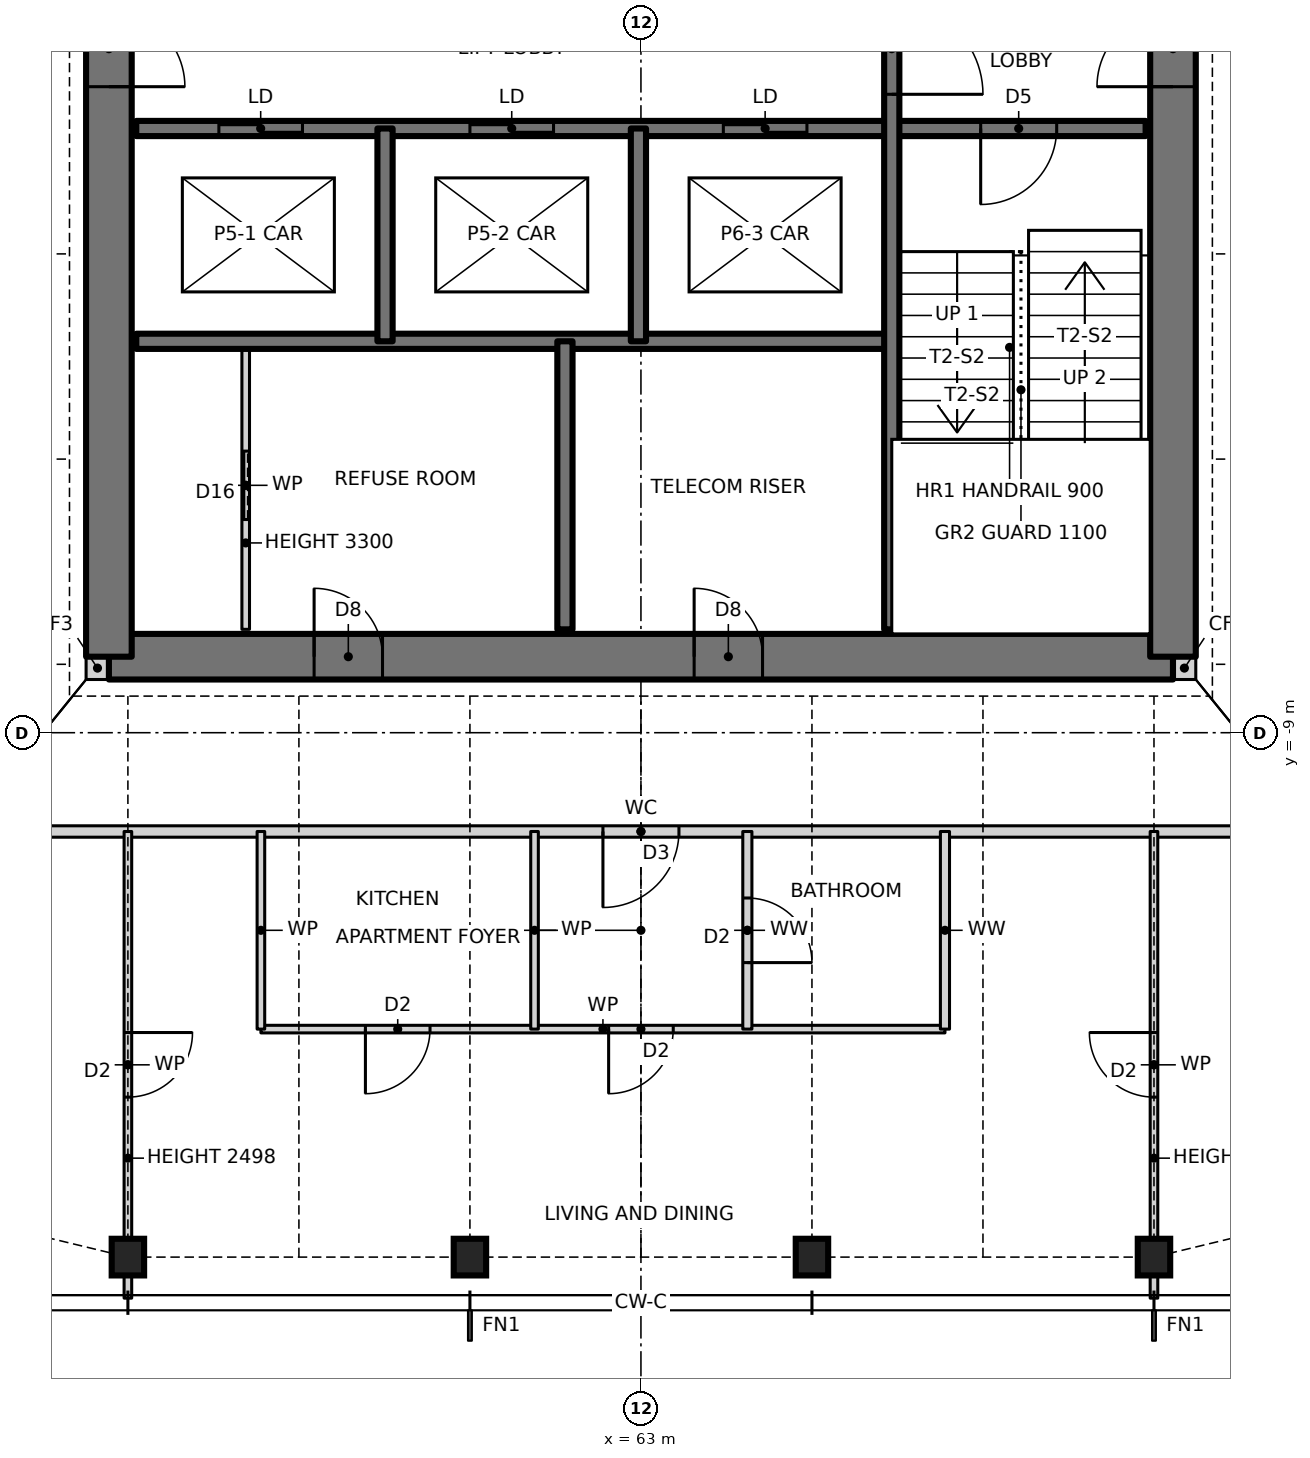
"""IFC4 building model, lengths in metres.
Left out: names, types, materials, properties, quantities, classifications, styles, units other than length and angle.
Written with IfcOpenShell. Run it as: python <this file> out.ifc"""

import sys

from ifc_helpers import new_model, si_unit, direction, frame, frame_2d, origin, origin_2d, place, context, subcontext, project, spatial, rectangle, i_section, extrude, element, fill, save


model = new_model("IFC4")
c1 = context("Model", 3, precision=1e-05, world=origin(), true_north=direction((0.0, 1.0)))
c2 = subcontext(c1, "Body", "Model", "MODEL_VIEW")
j1 = project(units=[si_unit("LENGTHUNIT", "METRE"), si_unit("PLANEANGLEUNIT", "RADIAN")], contexts=[c1])
p1 = place(None, origin())
s1 = spatial("IfcSite", under=j1, at=p1, CompositionType="ELEMENT")
p2 = place(p1, origin())
s2 = spatial("IfcBuilding", under=s1, at=p2, CompositionType="ELEMENT")
p3 = place(p2, frame((0.0, 0.0, 94.5)))
s3 = spatial("IfcBuildingStorey", under=s2, at=p3, CompositionType="ELEMENT", Elevation=94.5)
for number, where, z_axis, x_axis in (
    (1, (56.25, -15.9, 0.0), (0.0, 0.0, 1.0), (1.0, 0.0, 0.0)),
    (2, (60.75, -15.9, 0.0), (0.0, 0.0, 1.0), (1.0, 0.0, 0.0)),
    (3, (65.25, -15.9, 0.0), (0.0, 0.0, 1.0), (1.0, 0.0, 0.0)),
    (4, (69.75, -15.9, 0.0), (0.0, 0.0, 1.0), (1.0, 0.0, 0.0)),
):
    element("IfcColumn", number, at=place(p3, frame(where, z_axis=z_axis, x_axis=x_axis)), inside=s3, PredefinedType="COLUMN", context=c2, shape_type="SweptSolid", body=[
        extrude(i_section(OverallWidth=0.427, OverallDepth=0.483, WebThickness=0.051, FlangeThickness=0.082, at=origin_2d()), origin(), (0.0, 0.0, 1.0), 3.5),
    ])
for number, where, z_axis, x_axis in (
    (5, (55.7, -8.15, 0.0), (0.0, 0.0, 1.0), (1.0, 0.0, 0.0)),
    (6, (70.0, -8.15, 0.0), (0.0, 0.0, 1.0), (1.0, 0.0, 0.0)),
):
    element("IfcWall", number, at=place(p3, frame(where, z_axis=z_axis, x_axis=x_axis)), inside=s3, PredefinedType="SOLIDWALL", context=c2, shape_type="SweptSolid", body=[
        extrude(rectangle(XDim=0.3, YDim=0.3, at=frame_2d((0.15, 0.0))), origin(), (0.0, 0.0, 1.0), 3.5),
    ])
p4 = place(p3, frame((56.0, -8.0, 0.0), z_axis=(0.0, 0.0, 1.0), x_axis=(1.0, 0.0, 0.0)))
e7 = element("IfcWall", 7, at=p4, inside=s3, PredefinedType="SHEAR", context=c2, shape_type="SweptSolid", body=[
    extrude(rectangle(XDim=14.0, YDim=0.6, at=frame_2d((7.0, 0.0))), origin(), (0.0, 0.0, 1.0), 3.5),
])
p5 = place(p4, frame((2.7, 0.0, 0.0)))
e8 = element("IfcOpeningElement", 8, at=p5, cuts=e7, PredefinedType="OPENING", context=c2, shape_type="SweptSolid", body=[
    extrude(rectangle(XDim=0.9, YDim=2.1, at=frame_2d((0.45, 1.05))), frame((0.0, 0.31, 0.0), z_axis=(0.0, -1.0, 0.0), x_axis=(1.0, 0.0, 0.0)), (0.0, 0.0, 1.0), 0.62),
])
p6 = place(p4, frame((7.7, 0.0, 0.0)))
e9 = element("IfcOpeningElement", 9, at=p6, cuts=e7, PredefinedType="OPENING", context=c2, shape_type="SweptSolid", body=[
    extrude(rectangle(XDim=0.9, YDim=2.1, at=frame_2d((0.45, 1.05))), frame((0.0, 0.31, 0.0), z_axis=(0.0, -1.0, 0.0), x_axis=(1.0, 0.0, 0.0)), (0.0, 0.0, 1.0), 0.62),
])
p7 = place(p3, frame((70.0, -8.0, 0.0), z_axis=(0.0, 0.0, 1.0), x_axis=(0.0, 1.0, 0.0)))
e10 = element("IfcWall", 10, at=p7, inside=s3, PredefinedType="SHEAR", context=c2, shape_type="SweptSolid", body=[
    extrude(rectangle(XDim=16.0, YDim=0.6, at=frame_2d((8.0, 0.0))), origin(), (0.0, 0.0, 1.0), 3.5),
])
p8 = place(p7, frame((7.5, 0.0, 0.0)))
e11 = element("IfcOpeningElement", 11, at=p8, cuts=e10, PredefinedType="OPENING", context=c2, shape_type="SweptSolid", body=[
    extrude(rectangle(XDim=1.0, YDim=2.1, at=frame_2d((0.5, 1.05))), frame((0.0, 0.31, 0.0), z_axis=(0.0, -1.0, 0.0), x_axis=(1.0, 0.0, 0.0)), (0.0, 0.0, 1.0), 0.62),
])
p9 = place(p3, frame((56.0, 8.0, 0.0), z_axis=(0.0, 0.0, 1.0), x_axis=(0.0, -1.0, 0.0)))
e12 = element("IfcWall", 12, at=p9, inside=s3, PredefinedType="SHEAR", context=c2, shape_type="SweptSolid", body=[
    extrude(rectangle(XDim=16.0, YDim=0.6, at=frame_2d((8.0, 0.0))), origin(), (0.0, 0.0, 1.0), 3.5),
])
p10 = place(p9, frame((7.5, 0.0, 0.0)))
e13 = element("IfcOpeningElement", 13, at=p10, cuts=e12, PredefinedType="OPENING", context=c2, shape_type="SweptSolid", body=[
    extrude(rectangle(XDim=1.0, YDim=2.1, at=frame_2d((0.5, 1.05))), frame((0.0, 0.31, 0.0), z_axis=(0.0, -1.0, 0.0), x_axis=(1.0, 0.0, 0.0)), (0.0, 0.0, 1.0), 0.62),
])
p11 = place(p3, frame((58.0, -12.9, 0.0), z_axis=(0.0, 0.0, 1.0), x_axis=(1.0, 0.0, 0.0)))
e14 = element("IfcWall", 14, at=p11, inside=s3, PredefinedType="PARTITIONING", context=c2, shape_type="SweptSolid", body=[
    extrude(rectangle(XDim=9.0, YDim=0.1, at=frame_2d((4.5, 0.0))), origin(), (0.0, 0.0, 1.0), 3.27),
])
p12 = place(p11, frame((1.375, 0.0, 0.0)))
e15 = element("IfcOpeningElement", 15, at=p12, cuts=e14, PredefinedType="OPENING", context=c2, shape_type="SweptSolid", body=[
    extrude(rectangle(XDim=0.85, YDim=2.1, at=frame_2d((0.425, 1.05))), frame((0.0, 0.06, 0.0), z_axis=(0.0, -1.0, 0.0), x_axis=(1.0, 0.0, 0.0)), (0.0, 0.0, 1.0), 0.12),
])
p13 = place(p11, frame((4.575, 0.0, 0.0)))
e16 = element("IfcOpeningElement", 16, at=p13, cuts=e14, PredefinedType="OPENING", context=c2, shape_type="SweptSolid", body=[
    extrude(rectangle(XDim=0.85, YDim=2.1, at=frame_2d((0.425, 1.05))), frame((0.0, 0.06, 0.0), z_axis=(0.0, -1.0, 0.0), x_axis=(1.0, 0.0, 0.0)), (0.0, 0.0, 1.0), 0.12),
])
p14 = place(p3, frame((53.7, -10.3, 0.0), z_axis=(0.0, 0.0, 1.0), x_axis=(1.0, 0.0, 0.0)))
e17 = element("IfcWall", 17, at=p14, inside=s3, PredefinedType="PARTITIONING", context=c2, shape_type="SweptSolid", body=[
    extrude(rectangle(XDim=18.6, YDim=0.15, at=frame_2d((9.3, 0.0))), origin(), (0.0, 0.0, 1.0), 3.27),
])
p15 = place(p14, frame((8.8, 0.0, 0.0)))
e18 = element("IfcOpeningElement", 18, at=p15, cuts=e17, PredefinedType="OPENING", context=c2, shape_type="SweptSolid", body=[
    extrude(rectangle(XDim=1.0, YDim=2.1, at=frame_2d((0.5, 1.05))), frame((0.0, 0.085, 0.0), z_axis=(0.0, -1.0, 0.0), x_axis=(1.0, 0.0, 0.0)), (0.0, 0.0, 1.0), 0.17),
])
p16 = place(p3, frame((56.36, -3.85, 0.0), z_axis=(0.0, 0.0, 1.0), x_axis=(1.0, 0.0, 0.0)))
e19 = element("IfcWall", 19, at=p16, inside=s3, PredefinedType="SOLIDWALL", context=c2, shape_type="SweptSolid", body=[
    extrude(rectangle(XDim=9.94, YDim=0.2, at=frame_2d((4.97, 0.0))), origin(), (0.0, 0.0, 1.0), 3.5),
])
p17 = place(p3, frame((56.36, -1.05, 0.0), z_axis=(0.0, 0.0, 1.0), x_axis=(1.0, 0.0, 0.0)))
e20 = element("IfcWall", 20, at=p17, inside=s3, PredefinedType="SOLIDWALL", context=c2, shape_type="SweptSolid", body=[
    extrude(rectangle(XDim=13.28, YDim=0.2, at=frame_2d((6.64, 0.0))), origin(), (0.0, 0.0, 1.0), 3.5),
])
p18 = place(p17, frame((11.11, 0.0, 0.0)))
e21 = element("IfcOpeningElement", 21, at=p18, cuts=e20, PredefinedType="OPENING", context=c2, shape_type="SweptSolid", body=[
    extrude(rectangle(XDim=1.0, YDim=2.1, at=frame_2d((0.5, 1.05))), frame((0.0, 0.11, 0.0), z_axis=(0.0, -1.0, 0.0), x_axis=(1.0, 0.0, 0.0)), (0.0, 0.0, 1.0), 0.22),
])
p19 = place(p17, frame((1.087, 0.0, 0.0)))
e22 = element("IfcOpeningElement", 22, at=p19, cuts=e20, PredefinedType="OPENING", context=c2, shape_type="SweptSolid", body=[
    extrude(rectangle(XDim=1.1, YDim=2.1, at=frame_2d((0.55, 1.05))), frame((0.0, 0.11, 0.0), z_axis=(0.0, -1.0, 0.0), x_axis=(1.0, 0.0, 0.0)), (0.0, 0.0, 1.0), 0.22),
])
p20 = place(p17, frame((4.39, 0.0, 0.0)))
e23 = element("IfcOpeningElement", 23, at=p20, cuts=e20, PredefinedType="OPENING", context=c2, shape_type="SweptSolid", body=[
    extrude(rectangle(XDim=1.1, YDim=2.1, at=frame_2d((0.55, 1.05))), frame((0.0, 0.11, 0.0), z_axis=(0.0, -1.0, 0.0), x_axis=(1.0, 0.0, 0.0)), (0.0, 0.0, 1.0), 0.22),
])
p21 = place(p17, frame((7.724, 0.0, 0.0)))
e24 = element("IfcOpeningElement", 24, at=p21, cuts=e20, PredefinedType="OPENING", context=c2, shape_type="SweptSolid", body=[
    extrude(rectangle(XDim=1.1, YDim=2.1, at=frame_2d((0.55, 1.05))), frame((0.0, 0.11, 0.0), z_axis=(0.0, -1.0, 0.0), x_axis=(1.0, 0.0, 0.0)), (0.0, 0.0, 1.0), 0.22),
])
p22 = place(p3, frame((69.75, -16.44, 0.0), z_axis=(0.0, 0.0, 1.0), x_axis=(0.0, 1.0, 0.0)))
e25 = element("IfcWall", 25, at=p22, inside=s3, PredefinedType="PARTITIONING", context=c2, shape_type="SweptSolid", body=[
    extrude(rectangle(XDim=6.14, YDim=0.1, at=frame_2d((3.07, 0.0))), origin(), (0.0, 0.0, 1.0), 2.498),
])
p23 = place(p22, frame((2.645, 0.0, 0.0)))
e26 = element("IfcOpeningElement", 26, at=p23, cuts=e25, PredefinedType="OPENING", context=c2, shape_type="SweptSolid", body=[
    extrude(rectangle(XDim=0.85, YDim=2.1, at=frame_2d((0.425, 1.05))), frame((0.0, 0.06, 0.0), z_axis=(0.0, -1.0, 0.0), x_axis=(1.0, 0.0, 0.0)), (0.0, 0.0, 1.0), 0.12),
])
p24 = place(p3, frame((67.0, -12.9, 0.0), z_axis=(0.0, 0.0, 1.0), x_axis=(0.0, 1.0, 0.0)))
e27 = element("IfcWall", 27, at=p24, inside=s3, PredefinedType="PARTITIONING", context=c2, shape_type="SweptSolid", body=[
    extrude(rectangle(XDim=2.6, YDim=0.12, at=frame_2d((1.3, 0.0))), origin(), (0.0, 0.0, 1.0), 3.27),
])
p25 = place(p3, frame((66.3, -7.64, 0.0), z_axis=(0.0, 0.0, 1.0), x_axis=(0.0, 1.0, 0.0)))
e28 = element("IfcWall", 28, at=p25, inside=s3, PredefinedType="SOLIDWALL", context=c2, shape_type="SweptSolid", body=[
    extrude(rectangle(XDim=11.49, YDim=0.2, at=frame_2d((5.745, 0.0))), origin(), (0.0, 0.0, 1.0), 3.5),
])
p26 = place(p25, frame((7.04, 0.0, 0.0)))
e29 = element("IfcOpeningElement", 29, at=p26, cuts=e28, PredefinedType="OPENING", context=c2, shape_type="SweptSolid", body=[
    extrude(rectangle(XDim=1.2, YDim=2.1, at=frame_2d((0.6, 1.05))), frame((0.0, 0.11, 0.0), z_axis=(0.0, -1.0, 0.0), x_axis=(1.0, 0.0, 0.0)), (0.0, 0.0, 1.0), 0.22),
])
p27 = place(p3, frame((64.4, -12.9, 0.0), z_axis=(0.0, 0.0, 1.0), x_axis=(0.0, 1.0, 0.0)))
e30 = element("IfcWall", 30, at=p27, inside=s3, PredefinedType="PARTITIONING", context=c2, shape_type="SweptSolid", body=[
    extrude(rectangle(XDim=2.6, YDim=0.12, at=frame_2d((1.3, 0.0))), origin(), (0.0, 0.0, 1.0), 3.27),
])
p28 = place(p27, frame((0.875, 0.0, 0.0)))
e31 = element("IfcOpeningElement", 31, at=p28, cuts=e30, PredefinedType="OPENING", context=c2, shape_type="SweptSolid", body=[
    extrude(rectangle(XDim=0.85, YDim=2.1, at=frame_2d((0.425, 1.05))), frame((0.0, 0.07, 0.0), z_axis=(0.0, -1.0, 0.0), x_axis=(1.0, 0.0, 0.0)), (0.0, 0.0, 1.0), 0.14),
])
p29 = place(p3, frame((62.967, -3.85, 0.0), z_axis=(0.0, 0.0, 1.0), x_axis=(0.0, 1.0, 0.0)))
e32 = element("IfcWall", 32, at=p29, inside=s3, PredefinedType="SOLIDWALL", context=c2, shape_type="SweptSolid", body=[
    extrude(rectangle(XDim=2.8, YDim=0.2, at=frame_2d((1.4, 0.0))), origin(), (0.0, 0.0, 1.0), 3.5),
])
p30 = place(p3, frame((62.0, -7.64, 0.0), z_axis=(0.0, 0.0, 1.0), x_axis=(0.0, 1.0, 0.0)))
e33 = element("IfcWall", 33, at=p30, inside=s3, PredefinedType="SOLIDWALL", context=c2, shape_type="SweptSolid", body=[
    extrude(rectangle(XDim=3.79, YDim=0.2, at=frame_2d((1.895, 0.0))), origin(), (0.0, 0.0, 1.0), 3.5),
])
p31 = place(p3, frame((61.6, -12.9, 0.0), z_axis=(0.0, 0.0, 1.0), x_axis=(0.0, 1.0, 0.0)))
e34 = element("IfcWall", 34, at=p31, inside=s3, PredefinedType="PARTITIONING", context=c2, shape_type="SweptSolid", body=[
    extrude(rectangle(XDim=2.6, YDim=0.1, at=frame_2d((1.3, 0.0))), origin(), (0.0, 0.0, 1.0), 3.27),
])
p32 = place(p3, frame((59.633, -3.85, 0.0), z_axis=(0.0, 0.0, 1.0), x_axis=(0.0, 1.0, 0.0)))
e35 = element("IfcWall", 35, at=p32, inside=s3, PredefinedType="SOLIDWALL", context=c2, shape_type="SweptSolid", body=[
    extrude(rectangle(XDim=2.8, YDim=0.2, at=frame_2d((1.4, 0.0))), origin(), (0.0, 0.0, 1.0), 3.5),
])
p33 = place(p3, frame((58.0, -12.9, 0.0), z_axis=(0.0, 0.0, 1.0), x_axis=(0.0, 1.0, 0.0)))
e36 = element("IfcWall", 36, at=p33, inside=s3, PredefinedType="PARTITIONING", context=c2, shape_type="SweptSolid", body=[
    extrude(rectangle(XDim=2.6, YDim=0.1, at=frame_2d((1.3, 0.0))), origin(), (0.0, 0.0, 1.0), 3.27),
])
p34 = place(p3, frame((57.8, -7.64, 0.0), z_axis=(0.0, 0.0, 1.0), x_axis=(0.0, 1.0, 0.0)))
e37 = element("IfcWall", 37, at=p34, inside=s3, PredefinedType="PARTITIONING", context=c2, shape_type="SweptSolid", body=[
    extrude(rectangle(XDim=3.79, YDim=0.1, at=frame_2d((1.895, 0.0))), origin(), (0.0, 0.0, 1.0), 3.3),
])
p35 = place(p34, frame((1.445, 0.0, 0.0)))
e38 = element("IfcOpeningElement", 38, at=p35, cuts=e37, PredefinedType="OPENING", context=c2, shape_type="SweptSolid", body=[
    extrude(rectangle(XDim=0.9, YDim=2.1, at=frame_2d((0.45, 1.05))), frame((0.0, 0.06, 0.0), z_axis=(0.0, -1.0, 0.0), x_axis=(1.0, 0.0, 0.0)), (0.0, 0.0, 1.0), 0.12),
])
p36 = place(p3, frame((56.25, -16.44, 0.0), z_axis=(0.0, 0.0, 1.0), x_axis=(0.0, 1.0, 0.0)))
e39 = element("IfcWall", 39, at=p36, inside=s3, PredefinedType="PARTITIONING", context=c2, shape_type="SweptSolid", body=[
    extrude(rectangle(XDim=6.14, YDim=0.1, at=frame_2d((3.07, 0.0))), origin(), (0.0, 0.0, 1.0), 2.498),
])
p37 = place(p36, frame((2.645, 0.0, 0.0)))
e40 = element("IfcOpeningElement", 40, at=p37, cuts=e39, PredefinedType="OPENING", context=c2, shape_type="SweptSolid", body=[
    extrude(rectangle(XDim=0.85, YDim=2.1, at=frame_2d((0.425, 1.05))), frame((0.0, 0.06, 0.0), z_axis=(0.0, -1.0, 0.0), x_axis=(1.0, 0.0, 0.0)), (0.0, 0.0, 1.0), 0.12),
])
p38 = place(p18, frame((1.0, 0.0, 0.0), z_axis=(0.0, 0.0, 1.0), x_axis=(-1.0, 0.0, 0.0)))
e41 = element("IfcDoor", 41, at=p38, inside=s3, OperationType="SINGLE_SWING_RIGHT", PredefinedType="DOOR", context=c2, shape_type="SweptSolid", body=[
    extrude(rectangle(XDim=1.0, YDim=2.1, at=frame_2d((0.5, 1.05))), frame((0.0, 0.025, 0.0), z_axis=(0.0, -1.0, 0.0), x_axis=(1.0, 0.0, 0.0)), (0.0, 0.0, 1.0), 0.05),
])
fill(e21, e41)
p39 = place(p26, frame((1.2, 0.0, 0.0), z_axis=(0.0, 0.0, 1.0), x_axis=(-1.0, 0.0, 0.0)))
e42 = element("IfcDoor", 42, at=p39, inside=s3, OperationType="SINGLE_SWING_RIGHT", PredefinedType="DOOR", context=c2, shape_type="SweptSolid", body=[
    extrude(rectangle(XDim=1.2, YDim=2.1, at=frame_2d((0.6, 1.05))), frame((0.0, 0.025, 0.0), z_axis=(0.0, -1.0, 0.0), x_axis=(1.0, 0.0, 0.0)), (0.0, 0.0, 1.0), 0.05),
])
fill(e29, e42)
p40 = place(p35, origin())
e43 = element("IfcDoor", 43, at=p40, inside=s3, OperationType="SLIDING_TO_LEFT", PredefinedType="DOOR", context=c2, shape_type="SweptSolid", body=[
    extrude(rectangle(XDim=0.9, YDim=2.1, at=frame_2d((0.45, 1.05))), frame((0.0, 0.025, 0.0), z_axis=(0.0, -1.0, 0.0), x_axis=(1.0, 0.0, 0.0)), (0.0, 0.0, 1.0), 0.05),
])
fill(e38, e43)
p41 = place(p12, frame((0.85, 0.0, 0.0), z_axis=(0.0, 0.0, 1.0), x_axis=(-1.0, 0.0, 0.0)))
e44 = element("IfcDoor", 44, at=p41, inside=s3, OperationType="SINGLE_SWING_RIGHT", PredefinedType="DOOR", context=c2, shape_type="SweptSolid", body=[
    extrude(rectangle(XDim=0.85, YDim=2.1, at=frame_2d((0.425, 1.05))), frame((0.0, 0.025, 0.0), z_axis=(0.0, -1.0, 0.0), x_axis=(1.0, 0.0, 0.0)), (0.0, 0.0, 1.0), 0.05),
])
fill(e15, e44)
p42 = place(p15, frame((1.0, 0.0, 0.0), z_axis=(0.0, 0.0, 1.0), x_axis=(-1.0, 0.0, 0.0)))
e45 = element("IfcDoor", 45, at=p42, inside=s3, OperationType="SINGLE_SWING_RIGHT", PredefinedType="DOOR", context=c2, shape_type="SweptSolid", body=[
    extrude(rectangle(XDim=1.0, YDim=2.1, at=frame_2d((0.5, 1.05))), frame((0.0, 0.025, 0.0), z_axis=(0.0, -1.0, 0.0), x_axis=(1.0, 0.0, 0.0)), (0.0, 0.0, 1.0), 0.05),
])
fill(e18, e45)
p43 = place(p13, frame((0.85, 0.0, 0.0), z_axis=(0.0, 0.0, 1.0), x_axis=(-1.0, 0.0, 0.0)))
e46 = element("IfcDoor", 46, at=p43, inside=s3, OperationType="SINGLE_SWING_RIGHT", PredefinedType="DOOR", context=c2, shape_type="SweptSolid", body=[
    extrude(rectangle(XDim=0.85, YDim=2.1, at=frame_2d((0.425, 1.05))), frame((0.0, 0.025, 0.0), z_axis=(0.0, -1.0, 0.0), x_axis=(1.0, 0.0, 0.0)), (0.0, 0.0, 1.0), 0.05),
])
fill(e16, e46)
p44 = place(p28, frame((0.85, 0.0, 0.0), z_axis=(0.0, 0.0, 1.0), x_axis=(-1.0, 0.0, 0.0)))
e47 = element("IfcDoor", 47, at=p44, inside=s3, OperationType="SINGLE_SWING_RIGHT", PredefinedType="DOOR", context=c2, shape_type="SweptSolid", body=[
    extrude(rectangle(XDim=0.85, YDim=2.1, at=frame_2d((0.425, 1.05))), frame((0.0, 0.025, 0.0), z_axis=(0.0, -1.0, 0.0), x_axis=(1.0, 0.0, 0.0)), (0.0, 0.0, 1.0), 0.05),
])
fill(e31, e47)
p45 = place(p37, frame((0.85, 0.0, 0.0), z_axis=(0.0, 0.0, 1.0), x_axis=(-1.0, 0.0, 0.0)))
e48 = element("IfcDoor", 48, at=p45, inside=s3, OperationType="SINGLE_SWING_LEFT", PredefinedType="DOOR", context=c2, shape_type="SweptSolid", body=[
    extrude(rectangle(XDim=0.85, YDim=2.1, at=frame_2d((0.425, 1.05))), frame((0.0, 0.025, 0.0), z_axis=(0.0, -1.0, 0.0), x_axis=(1.0, 0.0, 0.0)), (0.0, 0.0, 1.0), 0.05),
])
fill(e40, e48)
p46 = place(p23, origin())
e49 = element("IfcDoor", 49, at=p46, inside=s3, OperationType="SINGLE_SWING_RIGHT", PredefinedType="DOOR", context=c2, shape_type="SweptSolid", body=[
    extrude(rectangle(XDim=0.85, YDim=2.1, at=frame_2d((0.425, 1.05))), frame((0.0, 0.025, 0.0), z_axis=(0.0, -1.0, 0.0), x_axis=(1.0, 0.0, 0.0)), (0.0, 0.0, 1.0), 0.05),
])
fill(e26, e49)
p47 = place(p10, origin())
e50 = element("IfcDoor", 50, at=p47, inside=s3, OperationType="SINGLE_SWING_RIGHT", PredefinedType="DOOR", context=c2, shape_type="SweptSolid", body=[
    extrude(rectangle(XDim=1.0, YDim=2.1, at=frame_2d((0.5, 1.05))), frame((0.0, 0.025, 0.0), z_axis=(0.0, -1.0, 0.0), x_axis=(1.0, 0.0, 0.0)), (0.0, 0.0, 1.0), 0.05),
])
fill(e13, e50)
p48 = place(p8, origin())
e51 = element("IfcDoor", 51, at=p48, inside=s3, OperationType="SINGLE_SWING_LEFT", PredefinedType="DOOR", context=c2, shape_type="SweptSolid", body=[
    extrude(rectangle(XDim=1.0, YDim=2.1, at=frame_2d((0.5, 1.05))), frame((0.0, 0.025, 0.0), z_axis=(0.0, -1.0, 0.0), x_axis=(1.0, 0.0, 0.0)), (0.0, 0.0, 1.0), 0.05),
])
fill(e11, e51)
p49 = place(p5, origin())
e52 = element("IfcDoor", 52, at=p49, inside=s3, OperationType="SINGLE_SWING_LEFT", PredefinedType="DOOR", context=c2, shape_type="SweptSolid", body=[
    extrude(rectangle(XDim=0.9, YDim=2.1, at=frame_2d((0.45, 1.05))), frame((0.0, 0.025, 0.0), z_axis=(0.0, -1.0, 0.0), x_axis=(1.0, 0.0, 0.0)), (0.0, 0.0, 1.0), 0.05),
])
fill(e8, e52)
p50 = place(p6, origin())
e53 = element("IfcDoor", 53, at=p50, inside=s3, OperationType="SINGLE_SWING_LEFT", PredefinedType="DOOR", context=c2, shape_type="SweptSolid", body=[
    extrude(rectangle(XDim=0.9, YDim=2.1, at=frame_2d((0.45, 1.05))), frame((0.0, 0.025, 0.0), z_axis=(0.0, -1.0, 0.0), x_axis=(1.0, 0.0, 0.0)), (0.0, 0.0, 1.0), 0.05),
])
fill(e9, e53)
p51 = place(p19, origin())
e54 = element("IfcDoor", 54, at=p51, inside=s3, OperationType="DOUBLE_DOOR_SLIDING", PredefinedType="DOOR", context=c2, shape_type="SweptSolid", body=[
    extrude(rectangle(XDim=1.1, YDim=2.1, at=frame_2d((0.55, 1.05))), frame((0.0, 0.025, 0.0), z_axis=(0.0, -1.0, 0.0), x_axis=(1.0, 0.0, 0.0)), (0.0, 0.0, 1.0), 0.05),
])
fill(e22, e54)
p52 = place(p20, origin())
e55 = element("IfcDoor", 55, at=p52, inside=s3, OperationType="DOUBLE_DOOR_SLIDING", PredefinedType="DOOR", context=c2, shape_type="SweptSolid", body=[
    extrude(rectangle(XDim=1.1, YDim=2.1, at=frame_2d((0.55, 1.05))), frame((0.0, 0.025, 0.0), z_axis=(0.0, -1.0, 0.0), x_axis=(1.0, 0.0, 0.0)), (0.0, 0.0, 1.0), 0.05),
])
fill(e23, e55)
p53 = place(p21, origin())
e56 = element("IfcDoor", 56, at=p53, inside=s3, OperationType="DOUBLE_DOOR_SLIDING", PredefinedType="DOOR", context=c2, shape_type="SweptSolid", body=[
    extrude(rectangle(XDim=1.1, YDim=2.1, at=frame_2d((0.55, 1.05))), frame((0.0, 0.025, 0.0), z_axis=(0.0, -1.0, 0.0), x_axis=(1.0, 0.0, 0.0)), (0.0, 0.0, 1.0), 0.05),
])
fill(e24, e56)
save(model, sys.argv[1])
